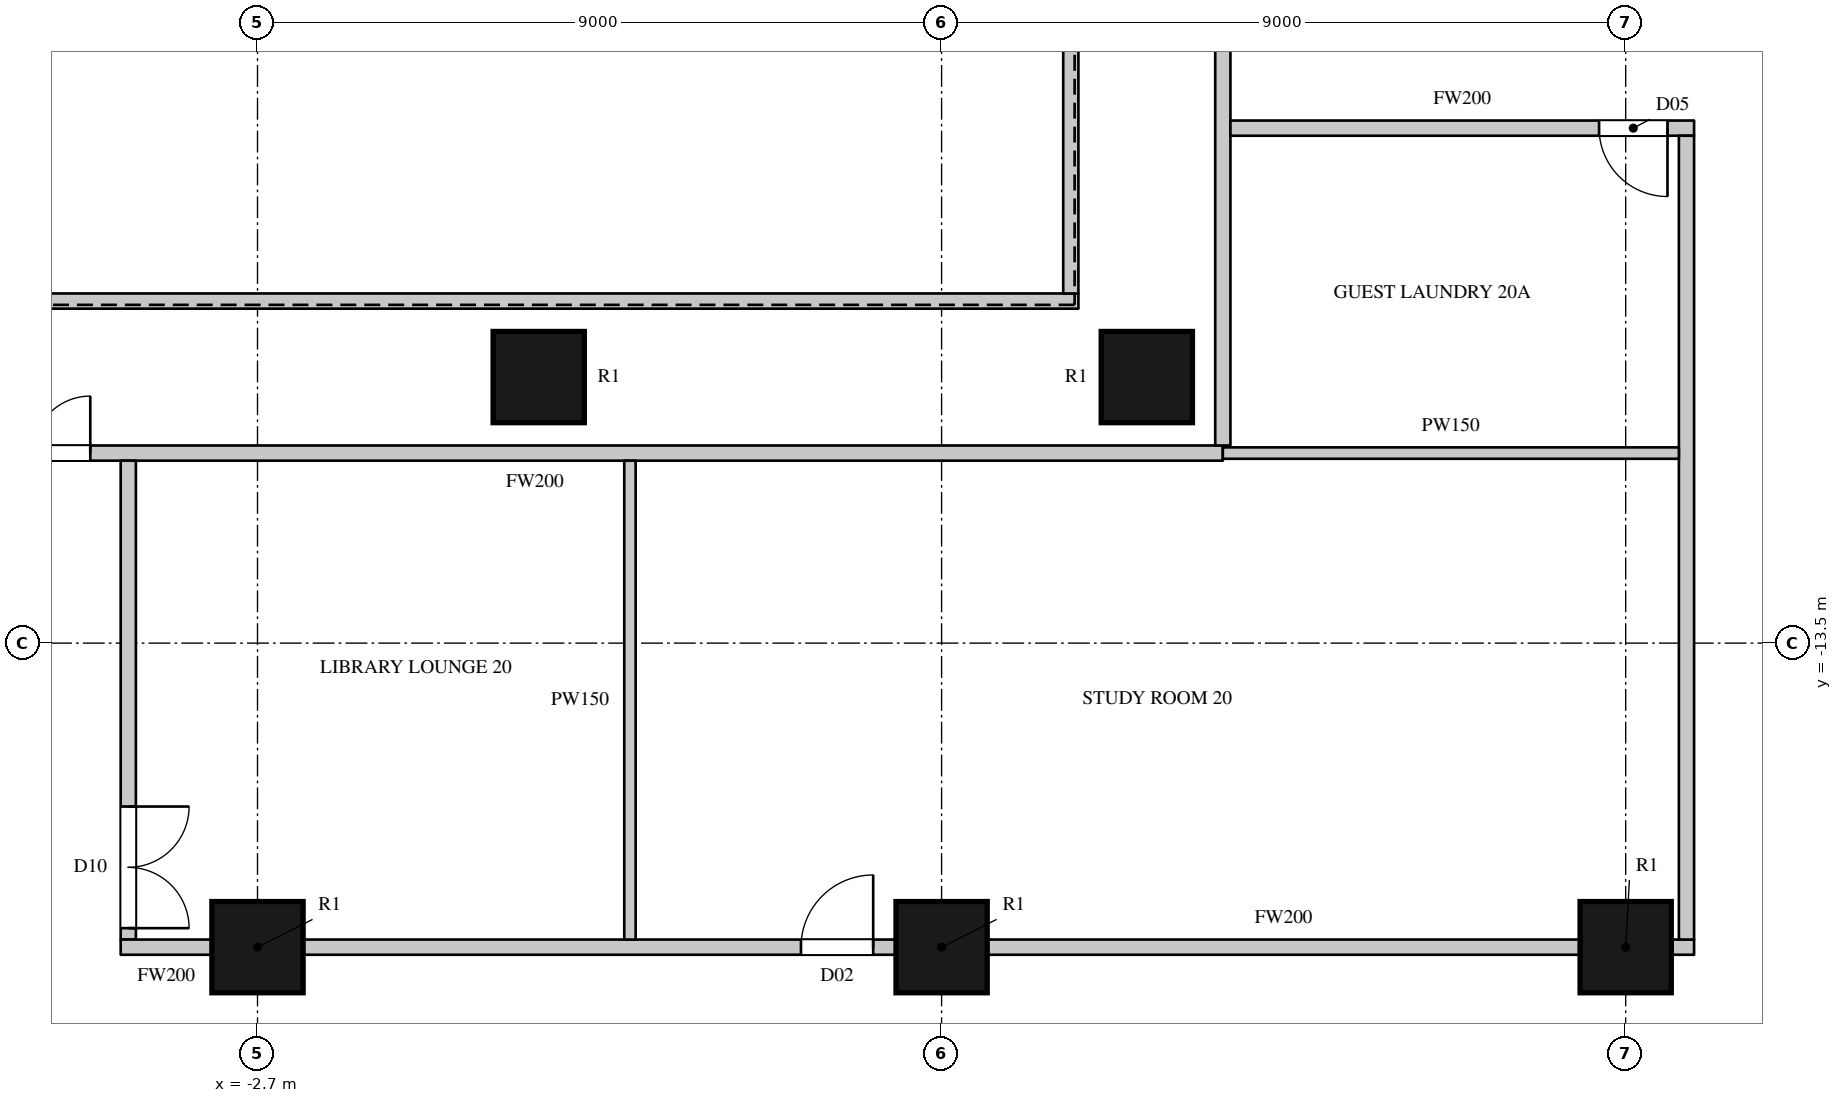
"""IFC4 building model, lengths in metres.
Left out: names, types, materials, properties, quantities, classifications, styles, units other than length and angle.
Written with IfcOpenShell. Run it as: python <this file> out.ifc"""

import sys

from ifc_helpers import new_model, si_unit, direction, frame, frame_2d, origin, origin_2d, place, context, subcontext, project, spatial, rectangle, circle, extrude, element, fill, save


model = new_model("IFC4")
c1 = context("Model", 3, precision=1e-05, world=origin(), true_north=direction((0.0, 1.0)))
c2 = subcontext(c1, "Body", "Model", "MODEL_VIEW")
j1 = project(units=[si_unit("LENGTHUNIT", "METRE"), si_unit("PLANEANGLEUNIT", "RADIAN")], contexts=[c1])
p1 = place(None, origin())
s1 = spatial("IfcSite", under=j1, at=p1, CompositionType="ELEMENT")
p2 = place(p1, origin())
s2 = spatial("IfcBuilding", under=s1, at=p2, CompositionType="ELEMENT")
p3 = place(p2, frame((0.0, 0.0, 102.3)))
s3 = spatial("IfcBuildingStorey", under=s2, at=p3, CompositionType="ELEMENT", Elevation=102.3)
for number, where, z_axis, x_axis in (
    (1, (-2.7, -17.5, 0.0), (0.0, 0.0, 1.0), (1.0, 0.0, 0.0)),
    (2, (6.3, -17.5, 0.0), (0.0, 0.0, 1.0), (1.0, 0.0, 0.0)),
    (3, (15.3, -17.5, 0.0), (0.0, 0.0, 1.0), (1.0, 0.0, 0.0)),
    (4, (1.0, -10.0, 0.0), (0.0, 0.0, 1.0), (1.0, 0.0, 0.0)),
    (5, (9.0, -10.0, 0.0), (0.0, 0.0, 1.0), (1.0, 0.0, 0.0)),
):
    element("IfcColumn", number, at=place(p3, frame(where, z_axis=z_axis, x_axis=x_axis)), inside=s3, PredefinedType="COLUMN", context=c2, shape_type="SweptSolid", body=[
        extrude(circle(Radius=0.6, at=origin_2d()), origin(), (0.0, 0.0, 1.0), 3.6),
    ])
p4 = place(p3, frame((-8.1, -11.0, 0.0), z_axis=(0.0, 0.0, 1.0), x_axis=(1.0, 0.0, 0.0)))
e6 = element("IfcWall", 6, at=p4, inside=s3, PredefinedType="PARTITIONING", context=c2, shape_type="SweptSolid", body=[
    extrude(rectangle(XDim=18.1, YDim=0.2, at=frame_2d((9.05, 0.0))), origin(), (0.0, 0.0, 1.0), 3.3),
])
p5 = place(p4, frame((1.7, 0.0, 0.0)))
e7 = element("IfcOpeningElement", 7, at=p5, cuts=e6, PredefinedType="OPENING", context=c2, shape_type="SweptSolid", body=[
    extrude(rectangle(XDim=1.5, YDim=2.2, at=frame_2d((0.75, 1.1))), frame((0.0, 0.11, 0.0), z_axis=(0.0, -1.0, 0.0), x_axis=(1.0, 0.0, 0.0)), (0.0, 0.0, 1.0), 0.22),
])
p6 = place(p3, frame((-6.1, -9.0, 0.0), z_axis=(0.0, 0.0, 1.0), x_axis=(1.0, 0.0, 0.0)))
e8 = element("IfcWall", 8, at=p6, inside=s3, PredefinedType="PARTITIONING", context=c2, shape_type="SweptSolid", body=[
    extrude(rectangle(XDim=14.2, YDim=0.2, at=frame_2d((7.1, 0.0))), origin(), (0.0, 0.0, 1.0), 3.3),
])
p7 = place(p3, frame((-4.4, -17.4, 0.0), z_axis=(0.0, 0.0, 1.0), x_axis=(0.0, 1.0, 0.0)))
e9 = element("IfcWall", 9, at=p7, inside=s3, PredefinedType="PARTITIONING", context=c2, shape_type="SweptSolid", body=[
    extrude(rectangle(XDim=6.3, YDim=0.2, at=frame_2d((3.15, 0.0))), origin(), (0.0, 0.0, 1.0), 3.3),
])
p8 = place(p7, frame((0.15, 0.0, 0.0)))
e10 = element("IfcOpeningElement", 10, at=p8, cuts=e9, PredefinedType="OPENING", context=c2, shape_type="SweptSolid", body=[
    extrude(rectangle(XDim=1.6, YDim=2.4, at=frame_2d((0.8, 1.2))), frame((0.0, 0.11, 0.0), z_axis=(0.0, -1.0, 0.0), x_axis=(1.0, 0.0, 0.0)), (0.0, 0.0, 1.0), 0.22),
])
p9 = place(p3, frame((-4.5, -17.5, 0.0), z_axis=(0.0, 0.0, 1.0), x_axis=(1.0, 0.0, 0.0)))
e11 = element("IfcWall", 11, at=p9, inside=s3, PredefinedType="PARTITIONING", context=c2, shape_type="SweptSolid", body=[
    extrude(rectangle(XDim=1.2, YDim=0.2, at=frame_2d((0.6, 0.0))), origin(), (0.0, 0.0, 1.0), 2.75),
])
p10 = place(p3, frame((-2.1, -17.5, 0.0), z_axis=(0.0, 0.0, 1.0), x_axis=(1.0, 0.0, 0.0)))
e12 = element("IfcWall", 12, at=p10, inside=s3, PredefinedType="PARTITIONING", context=c2, shape_type="SweptSolid", body=[
    extrude(rectangle(XDim=7.8, YDim=0.2, at=frame_2d((3.9, 0.0))), origin(), (0.0, 0.0, 1.0), 2.75),
])
p11 = place(p10, frame((6.55, 0.0, 0.0)))
e13 = element("IfcOpeningElement", 13, at=p11, cuts=e12, PredefinedType="OPENING", context=c2, shape_type="SweptSolid", body=[
    extrude(rectangle(XDim=0.95, YDim=2.2, at=frame_2d((0.475, 1.1))), frame((0.0, 0.11, 0.0), z_axis=(0.0, -1.0, 0.0), x_axis=(1.0, 0.0, 0.0)), (0.0, 0.0, 1.0), 0.22),
])
p12 = place(p3, frame((6.9, -17.5, 0.0), z_axis=(0.0, 0.0, 1.0), x_axis=(1.0, 0.0, 0.0)))
e14 = element("IfcWall", 14, at=p12, inside=s3, PredefinedType="PARTITIONING", context=c2, shape_type="SweptSolid", body=[
    extrude(rectangle(XDim=7.8, YDim=0.2, at=frame_2d((3.9, 0.0))), origin(), (0.0, 0.0, 1.0), 2.75),
])
p13 = place(p3, frame((15.9, -17.5, 0.0), z_axis=(0.0, 0.0, 1.0), x_axis=(1.0, 0.0, 0.0)))
e15 = element("IfcWall", 15, at=p13, inside=s3, PredefinedType="PARTITIONING", context=c2, shape_type="SweptSolid", body=[
    extrude(rectangle(XDim=0.3, YDim=0.2, at=frame_2d((0.15, 0.0))), origin(), (0.0, 0.0, 1.0), 3.3),
])
p14 = place(p3, frame((8.0, -8.9, 0.0), z_axis=(0.0, 0.0, 1.0), x_axis=(0.0, 1.0, 0.0)))
e16 = element("IfcWall", 16, at=p14, inside=s3, PredefinedType="PARTITIONING", context=c2, shape_type="SweptSolid", body=[
    extrude(rectangle(XDim=17.8, YDim=0.2, at=frame_2d((8.9, 0.0))), origin(), (0.0, 0.0, 1.0), 3.3),
])
p15 = place(p3, frame((10.0, -10.9, 0.0), z_axis=(0.0, 0.0, 1.0), x_axis=(0.0, 1.0, 0.0)))
e17 = element("IfcWall", 17, at=p15, inside=s3, PredefinedType="PARTITIONING", context=c2, shape_type="SweptSolid", body=[
    extrude(rectangle(XDim=21.8, YDim=0.2, at=frame_2d((10.9, 0.0))), origin(), (0.0, 0.0, 1.0), 3.3),
])
p16 = place(p15, frame((15.9, 0.0, 0.0)))
e18 = element("IfcOpeningElement", 18, at=p16, cuts=e17, PredefinedType="OPENING", context=c2, shape_type="SweptSolid", body=[
    extrude(rectangle(XDim=1.5, YDim=2.2, at=frame_2d((0.75, 1.1))), frame((0.0, 0.11, 0.0), z_axis=(0.0, -1.0, 0.0), x_axis=(1.0, 0.0, 0.0)), (0.0, 0.0, 1.0), 0.22),
])
p17 = place(p15, frame((11.55, 0.0, 0.0)))
e19 = element("IfcOpeningElement", 19, at=p17, cuts=e17, PredefinedType="OPENING", context=c2, shape_type="SweptSolid", body=[
    extrude(rectangle(XDim=1.5, YDim=2.2, at=frame_2d((0.75, 1.1))), frame((0.0, 0.11, 0.0), z_axis=(0.0, -1.0, 0.0), x_axis=(1.0, 0.0, 0.0)), (0.0, 0.0, 1.0), 0.22),
])
p18 = place(p3, frame((10.1, -6.725, 0.0), z_axis=(0.0, 0.0, 1.0), x_axis=(1.0, 0.0, 0.0)))
e20 = element("IfcWall", 20, at=p18, inside=s3, PredefinedType="PARTITIONING", context=c2, shape_type="SweptSolid", body=[
    extrude(rectangle(XDim=6.1, YDim=0.2, at=frame_2d((3.05, 0.0))), origin(), (0.0, 0.0, 1.0), 3.3),
])
p19 = place(p18, frame((4.85, 0.0, 0.0)))
e21 = element("IfcOpeningElement", 21, at=p19, cuts=e20, PredefinedType="OPENING", context=c2, shape_type="SweptSolid", body=[
    extrude(rectangle(XDim=0.9, YDim=2.2, at=frame_2d((0.45, 1.1))), frame((0.0, 0.11, 0.0), z_axis=(0.0, -1.0, 0.0), x_axis=(1.0, 0.0, 0.0)), (0.0, 0.0, 1.0), 0.22),
])
p20 = place(p3, frame((16.1, -17.4, 0.0), z_axis=(0.0, 0.0, 1.0), x_axis=(0.0, 1.0, 0.0)))
e22 = element("IfcWall", 22, at=p20, inside=s3, PredefinedType="PARTITIONING", context=c2, shape_type="SweptSolid", body=[
    extrude(rectangle(XDim=10.575, YDim=0.2, at=frame_2d((5.288, 0.0))), origin(), (0.0, 0.0, 1.0), 3.3),
])
p21 = place(p3, frame((2.2, -17.4, 0.0), z_axis=(0.0, 0.0, 1.0), x_axis=(0.0, 1.0, 0.0)))
e23 = element("IfcWall", 23, at=p21, inside=s3, PredefinedType="PARTITIONING", context=c2, shape_type="SweptSolid", body=[
    extrude(rectangle(XDim=6.3, YDim=0.15, at=frame_2d((3.15, 0.0))), origin(), (0.0, 0.0, 1.0), 3.3),
])
p22 = place(p3, frame((10.0, -11.0, 0.0), z_axis=(0.0, 0.0, 1.0), x_axis=(1.0, 0.0, 0.0)))
e24 = element("IfcWall", 24, at=p22, inside=s3, PredefinedType="PARTITIONING", context=c2, shape_type="SweptSolid", body=[
    extrude(rectangle(XDim=6.0, YDim=0.15, at=frame_2d((3.0, 0.0))), origin(), (0.0, 0.0, 1.0), 3.3),
])
p23 = place(p5, origin())
e25 = element("IfcDoor", 25, at=p23, inside=s3, OperationType="DOUBLE_DOOR_SINGLE_SWING", PredefinedType="DOOR", context=c2, shape_type="SweptSolid", body=[
    extrude(rectangle(XDim=1.5, YDim=2.2, at=frame_2d((0.75, 1.1))), frame((0.0, 0.025, 0.0), z_axis=(0.0, -1.0, 0.0), x_axis=(1.0, 0.0, 0.0)), (0.0, 0.0, 1.0), 0.05),
])
fill(e7, e25)
p24 = place(p8, origin())
e26 = element("IfcDoor", 26, at=p24, inside=s3, OperationType="DOUBLE_DOOR_SINGLE_SWING", PredefinedType="DOOR", context=c2, shape_type="SweptSolid", body=[
    extrude(rectangle(XDim=1.6, YDim=2.4, at=frame_2d((0.8, 1.2))), frame((0.0, 0.025, 0.0), z_axis=(0.0, -1.0, 0.0), x_axis=(1.0, 0.0, 0.0)), (0.0, 0.0, 1.0), 0.05),
])
fill(e10, e26)
p25 = place(p11, origin())
e27 = element("IfcDoor", 27, at=p25, inside=s3, OperationType="SINGLE_SWING_RIGHT", PredefinedType="DOOR", context=c2, shape_type="SweptSolid", body=[
    extrude(rectangle(XDim=0.95, YDim=2.2, at=frame_2d((0.475, 1.1))), frame((0.0, 0.025, 0.0), z_axis=(0.0, -1.0, 0.0), x_axis=(1.0, 0.0, 0.0)), (0.0, 0.0, 1.0), 0.05),
])
fill(e13, e27)
p26 = place(p19, origin())
e28 = element("IfcDoor", 28, at=p26, inside=s3, OperationType="SINGLE_SWING_LEFT", PredefinedType="DOOR", context=c2, shape_type="SweptSolid", body=[
    extrude(rectangle(XDim=0.9, YDim=2.2, at=frame_2d((0.45, 1.1))), frame((0.0, 0.025, 0.0), z_axis=(0.0, -1.0, 0.0), x_axis=(1.0, 0.0, 0.0)), (0.0, 0.0, 1.0), 0.05),
])
fill(e21, e28)
save(model, sys.argv[1])
